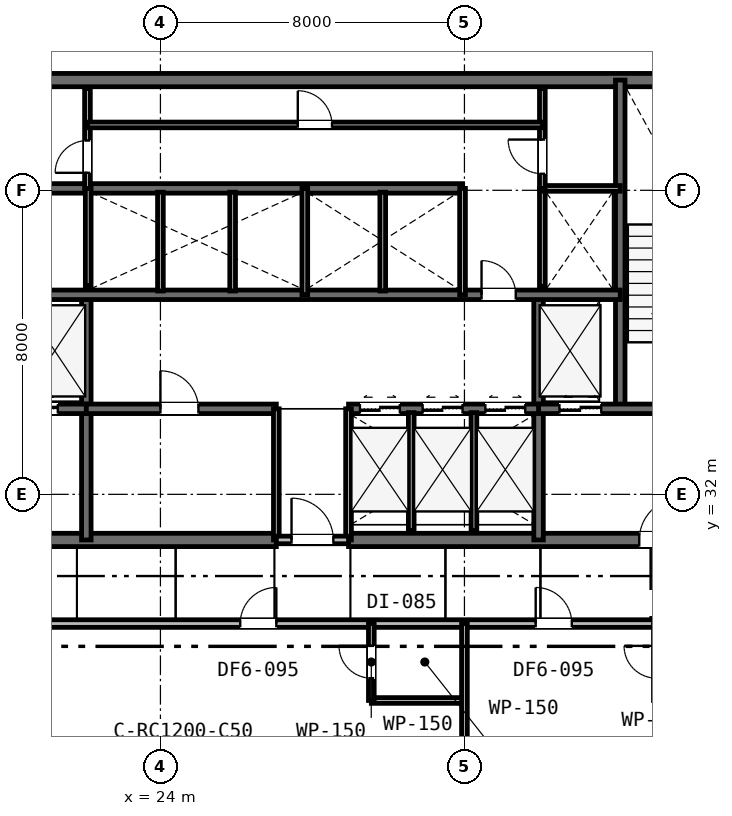
"""IFC4 building model, lengths in metres.
Left out: names, types, materials, properties, quantities, classifications, styles, units other than length and angle.
Written with IfcOpenShell. Run it as: python <this file> out.ifc"""

import sys

from ifc_helpers import new_model, si_unit, direction, frame, frame_2d, origin, place, context, subcontext, project, spatial, rectangle, extrude, element, fill, save


model = new_model("IFC4")
c1 = context("Model", 3, precision=1e-05, world=origin(), true_north=direction((0.0, 1.0)))
c2 = subcontext(c1, "Body", "Model", "MODEL_VIEW")
j1 = project(units=[si_unit("LENGTHUNIT", "METRE"), si_unit("PLANEANGLEUNIT", "RADIAN")], contexts=[c1])
p1 = place(None, origin())
s1 = spatial("IfcSite", under=j1, at=p1, CompositionType="ELEMENT")
p2 = place(p1, origin())
s2 = spatial("IfcBuilding", under=s1, at=p2, CompositionType="ELEMENT")
p3 = place(p2, frame((0.0, 0.0, 97.2)))
s3 = spatial("IfcBuildingStorey", under=s2, at=p3, CompositionType="ELEMENT", Elevation=97.2)
p4 = place(p3, frame((15.85, 42.9, 0.0), z_axis=(0.0, 0.0, 1.0), x_axis=(1.0, 0.0, 0.0)))
e1 = element("IfcWall", 1, at=p4, inside=s3, PredefinedType="SHEAR", context=c2, shape_type="SweptSolid", body=[
    extrude(rectangle(XDim=24.3, YDim=0.35, at=frame_2d((12.15, 0.0))), origin(), (0.0, 0.0, 1.0), 3.6),
])
p5 = place(p3, frame((15.85, 30.8, 0.0), z_axis=(0.0, 0.0, 1.0), x_axis=(1.0, 0.0, 0.0)))
e2 = element("IfcWall", 2, at=p5, inside=s3, PredefinedType="SHEAR", context=c2, shape_type="SweptSolid", body=[
    extrude(rectangle(XDim=11.2, YDim=0.35, at=frame_2d((5.6, 0.0))), origin(), (0.0, 0.0, 1.0), 3.6),
])
p6 = place(p5, frame((2.45, 0.0, 0.0)))
e3 = element("IfcOpeningElement", 3, at=p6, cuts=e2, PredefinedType="OPENING", context=c2, shape_type="SweptSolid", body=[
    extrude(rectangle(XDim=1.1, YDim=2.15, at=frame_2d((0.55, 1.075))), frame((0.0, 0.185, 0.0), z_axis=(0.0, -1.0, 0.0), x_axis=(1.0, 0.0, 0.0)), (0.0, 0.0, 1.0), 0.37),
])
p7 = place(p3, frame((28.95, 30.8, 0.0), z_axis=(0.0, 0.0, 1.0), x_axis=(1.0, 0.0, 0.0)))
e4 = element("IfcWall", 4, at=p7, inside=s3, PredefinedType="SHEAR", context=c2, shape_type="SweptSolid", body=[
    extrude(rectangle(XDim=11.2, YDim=0.35, at=frame_2d((5.6, 0.0))), origin(), (0.0, 0.0, 1.0), 3.6),
])
p8 = place(p7, frame((7.65, 0.0, 0.0)))
e5 = element("IfcOpeningElement", 5, at=p8, cuts=e4, PredefinedType="OPENING", context=c2, shape_type="SweptSolid", body=[
    extrude(rectangle(XDim=1.1, YDim=2.15, at=frame_2d((0.55, 1.075))), frame((0.0, 0.185, 0.0), z_axis=(0.0, -1.0, 0.0), x_axis=(1.0, 0.0, 0.0)), (0.0, 0.0, 1.0), 0.37),
])
p9 = place(p3, frame((36.1, 34.25, 0.0), z_axis=(0.0, 0.0, 1.0), x_axis=(0.0, 1.0, 0.0)))
e6 = element("IfcWall", 6, at=p9, inside=s3, PredefinedType="SHEAR", context=c2, shape_type="SweptSolid", body=[
    extrude(rectangle(XDim=8.65, YDim=0.25, at=frame_2d((4.325, 0.0))), origin(), (0.0, 0.0, 1.0), 3.6),
])
for number, where, z_axis, x_axis in (
    (7, (22.05, 30.8, 0.0), (0.0, 0.0, 1.0), (0.0, 1.0, 0.0)),
    (8, (33.95, 30.8, 0.0), (0.0, 0.0, 1.0), (0.0, 1.0, 0.0)),
):
    element("IfcWall", number, at=place(p3, frame(where, z_axis=z_axis, x_axis=x_axis)), inside=s3, PredefinedType="SHEAR", context=c2, shape_type="SweptSolid", body=[
        extrude(rectangle(XDim=6.45, YDim=0.25, at=frame_2d((3.225, 0.0))), origin(), (0.0, 0.0, 1.0), 3.6),
    ])
p10 = place(p3, frame((16.0, 34.25, 0.0), z_axis=(0.0, 0.0, 1.0), x_axis=(1.0, 0.0, 0.0)))
e9 = element("IfcWall", 9, at=p10, inside=s3, PredefinedType="SHEAR", context=c2, shape_type="SweptSolid", body=[
    extrude(rectangle(XDim=6.05, YDim=0.25, at=frame_2d((3.025, 0.0))), origin(), (0.0, 0.0, 1.0), 3.6),
])
p11 = place(p10, frame((1.25, 0.0, 0.0)))
e10 = element("IfcOpeningElement", 10, at=p11, cuts=e9, PredefinedType="OPENING", context=c2, shape_type="SweptSolid", body=[
    extrude(rectangle(XDim=1.0, YDim=2.15, at=frame_2d((0.5, 1.075))), frame((0.0, 0.135, 0.0), z_axis=(0.0, -1.0, 0.0), x_axis=(1.0, 0.0, 0.0)), (0.0, 0.0, 1.0), 0.27),
])
p12 = place(p10, frame((4.2, 0.0, 0.0)))
e11 = element("IfcOpeningElement", 11, at=p12, cuts=e9, PredefinedType="OPENING", context=c2, shape_type="SweptSolid", body=[
    extrude(rectangle(XDim=1.1, YDim=2.15, at=frame_2d((0.55, 1.075))), frame((0.0, 0.135, 0.0), z_axis=(0.0, -1.0, 0.0), x_axis=(1.0, 0.0, 0.0)), (0.0, 0.0, 1.0), 0.27),
])
p13 = place(p3, frame((33.95, 34.25, 0.0), z_axis=(0.0, 0.0, 1.0), x_axis=(1.0, 0.0, 0.0)))
e12 = element("IfcWall", 12, at=p13, inside=s3, PredefinedType="SHEAR", context=c2, shape_type="SweptSolid", body=[
    extrude(rectangle(XDim=6.05, YDim=0.25, at=frame_2d((3.025, 0.0))), origin(), (0.0, 0.0, 1.0), 3.6),
])
p14 = place(p13, frame((3.7, 0.0, 0.0)))
e13 = element("IfcOpeningElement", 13, at=p14, cuts=e12, PredefinedType="OPENING", context=c2, shape_type="SweptSolid", body=[
    extrude(rectangle(XDim=1.0, YDim=2.15, at=frame_2d((0.5, 1.075))), frame((0.0, 0.135, 0.0), z_axis=(0.0, -1.0, 0.0), x_axis=(1.0, 0.0, 0.0)), (0.0, 0.0, 1.0), 0.27),
])
p15 = place(p13, frame((0.55, 0.0, 0.0)))
e14 = element("IfcOpeningElement", 14, at=p15, cuts=e12, PredefinedType="OPENING", context=c2, shape_type="SweptSolid", body=[
    extrude(rectangle(XDim=1.1, YDim=2.15, at=frame_2d((0.55, 1.075))), frame((0.0, 0.135, 0.0), z_axis=(0.0, -1.0, 0.0), x_axis=(1.0, 0.0, 0.0)), (0.0, 0.0, 1.0), 0.27),
])
p16 = place(p3, frame((22.05, 34.25, 0.0), z_axis=(0.0, 0.0, 1.0), x_axis=(1.0, 0.0, 0.0)))
e15 = element("IfcWall", 15, at=p16, inside=s3, PredefinedType="SHEAR", context=c2, shape_type="SweptSolid", body=[
    extrude(rectangle(XDim=5.0, YDim=0.25, at=frame_2d((2.5, 0.0))), origin(), (0.0, 0.0, 1.0), 3.6),
])
p17 = place(p16, frame((1.95, 0.0, 0.0)))
e16 = element("IfcOpeningElement", 16, at=p17, cuts=e15, PredefinedType="OPENING", context=c2, shape_type="SweptSolid", body=[
    extrude(rectangle(XDim=1.0, YDim=2.15, at=frame_2d((0.5, 1.075))), frame((0.0, 0.135, 0.0), z_axis=(0.0, -1.0, 0.0), x_axis=(1.0, 0.0, 0.0)), (0.0, 0.0, 1.0), 0.27),
])
p18 = place(p3, frame((28.95, 34.25, 0.0), z_axis=(0.0, 0.0, 1.0), x_axis=(1.0, 0.0, 0.0)))
e17 = element("IfcWall", 17, at=p18, inside=s3, PredefinedType="SHEAR", context=c2, shape_type="SweptSolid", body=[
    extrude(rectangle(XDim=5.0, YDim=0.25, at=frame_2d((2.5, 0.0))), origin(), (0.0, 0.0, 1.0), 3.6),
])
p19 = place(p18, frame((0.3, 0.0, 0.0)))
e18 = element("IfcOpeningElement", 18, at=p19, cuts=e17, PredefinedType="OPENING", context=c2, shape_type="SweptSolid", body=[
    extrude(rectangle(XDim=1.05, YDim=2.15, at=frame_2d((0.525, 1.075))), frame((0.0, 0.135, 0.0), z_axis=(0.0, -1.0, 0.0), x_axis=(1.0, 0.0, 0.0)), (0.0, 0.0, 1.0), 0.27),
])
p20 = place(p18, frame((1.95, 0.0, 0.0)))
e19 = element("IfcOpeningElement", 19, at=p20, cuts=e17, PredefinedType="OPENING", context=c2, shape_type="SweptSolid", body=[
    extrude(rectangle(XDim=1.05, YDim=2.15, at=frame_2d((0.525, 1.075))), frame((0.0, 0.135, 0.0), z_axis=(0.0, -1.0, 0.0), x_axis=(1.0, 0.0, 0.0)), (0.0, 0.0, 1.0), 0.27),
])
p21 = place(p18, frame((3.6, 0.0, 0.0)))
e20 = element("IfcOpeningElement", 20, at=p21, cuts=e17, PredefinedType="OPENING", context=c2, shape_type="SweptSolid", body=[
    extrude(rectangle(XDim=1.05, YDim=2.15, at=frame_2d((0.525, 1.075))), frame((0.0, 0.135, 0.0), z_axis=(0.0, -1.0, 0.0), x_axis=(1.0, 0.0, 0.0)), (0.0, 0.0, 1.0), 0.27),
])
p22 = place(p3, frame((19.9, 37.25, 0.0), z_axis=(0.0, 0.0, 1.0), x_axis=(1.0, 0.0, 0.0)))
e21 = element("IfcWall", 21, at=p22, inside=s3, PredefinedType="SHEAR", context=c2, shape_type="SweptSolid", body=[
    extrude(rectangle(XDim=16.2, YDim=0.25, at=frame_2d((8.1, 0.0))), origin(), (0.0, 0.0, 1.0), 3.6),
])
p23 = place(p22, frame((12.55, 0.0, 0.0)))
e22 = element("IfcOpeningElement", 22, at=p23, cuts=e21, PredefinedType="OPENING", context=c2, shape_type="SweptSolid", body=[
    extrude(rectangle(XDim=0.9, YDim=2.15, at=frame_2d((0.45, 1.075))), frame((0.0, 0.135, 0.0), z_axis=(0.0, -1.0, 0.0), x_axis=(1.0, 0.0, 0.0)), (0.0, 0.0, 1.0), 0.27),
])
p24 = place(p3, frame((19.9, 40.05, 0.0), z_axis=(0.0, 0.0, 1.0), x_axis=(1.0, 0.0, 0.0)))
e23 = element("IfcWall", 23, at=p24, inside=s3, PredefinedType="SHEAR", context=c2, shape_type="SweptSolid", body=[
    extrude(rectangle(XDim=12.05, YDim=0.25, at=frame_2d((6.025, 0.0))), origin(), (0.0, 0.0, 1.0), 3.6),
])
p25 = place(p3, frame((27.05, 30.8, 0.0), z_axis=(0.0, 0.0, 1.0), x_axis=(0.0, 1.0, 0.0)))
e24 = element("IfcWall", 24, at=p25, inside=s3, PredefinedType="PLUMBINGWALL", context=c2, shape_type="SweptSolid", body=[
    extrude(rectangle(XDim=3.45, YDim=0.15, at=frame_2d((1.725, 0.0))), origin(), (0.0, 0.0, 1.0), 3.02),
])
p26 = place(p3, frame((28.95, 30.8, 0.0), z_axis=(0.0, 0.0, 1.0), x_axis=(0.0, 1.0, 0.0)))
e25 = element("IfcWall", 25, at=p26, inside=s3, PredefinedType="PLUMBINGWALL", context=c2, shape_type="SweptSolid", body=[
    extrude(rectangle(XDim=3.45, YDim=0.15, at=frame_2d((1.725, 0.0))), origin(), (0.0, 0.0, 1.0), 3.33),
])
p27 = place(p3, frame((27.05, 30.8, 0.0), z_axis=(0.0, 0.0, 1.0), x_axis=(1.0, 0.0, 0.0)))
e26 = element("IfcWall", 26, at=p27, inside=s3, PredefinedType="PARTITIONING", context=c2, shape_type="SweptSolid", body=[
    extrude(rectangle(XDim=1.9, YDim=0.2, at=frame_2d((0.95, 0.0))), origin(), (0.0, 0.0, 1.0), 3.02),
])
p28 = place(p27, frame((0.4, 0.0, 0.0)))
e27 = element("IfcOpeningElement", 27, at=p28, cuts=e26, PredefinedType="OPENING", context=c2, shape_type="SweptSolid", body=[
    extrude(rectangle(XDim=1.1, YDim=2.15, at=frame_2d((0.55, 1.075))), frame((0.0, 0.11, 0.0), z_axis=(0.0, -1.0, 0.0), x_axis=(1.0, 0.0, 0.0)), (0.0, 0.0, 1.0), 0.22),
])
for number, where, z_axis, x_axis in (
    (28, (30.6, 31.05, 0.0), (0.0, 0.0, 1.0), (0.0, 1.0, 0.0)),
    (29, (32.25, 31.05, 0.0), (0.0, 0.0, 1.0), (0.0, 1.0, 0.0)),
):
    element("IfcWall", number, at=place(p3, frame(where, z_axis=z_axis, x_axis=x_axis)), inside=s3, PredefinedType="PLUMBINGWALL", context=c2, shape_type="SweptSolid", body=[
        extrude(rectangle(XDim=3.1, YDim=0.15, at=frame_2d((1.55, 0.0))), origin(), (0.0, 0.0, 1.0), 3.33),
    ])
p29 = place(p3, frame((22.1, 37.49, 0.0), z_axis=(0.0, 0.0, 1.0), x_axis=(0.0, 1.0, 0.0)))
e30 = element("IfcWall", 30, at=p29, inside=s3, PredefinedType="PLUMBINGWALL", context=c2, shape_type="SweptSolid", body=[
    extrude(rectangle(XDim=2.56, YDim=0.15, at=frame_2d((1.28, 0.0))), origin(), (0.0, 0.0, 1.0), 3.33),
])
p30 = place(p3, frame((27.8, 37.25, 0.0), z_axis=(0.0, 0.0, 1.0), x_axis=(0.0, 1.0, 0.0)))
e31 = element("IfcWall", 31, at=p30, inside=s3, PredefinedType="PLUMBINGWALL", context=c2, shape_type="SweptSolid", body=[
    extrude(rectangle(XDim=2.8, YDim=0.15, at=frame_2d((1.4, 0.0))), origin(), (0.0, 0.0, 1.0), 3.33),
])
for number, where, z_axis, x_axis in (
    (32, (24.0, 37.35, 0.0), (0.0, 0.0, 1.0), (0.0, 1.0, 0.0)),
    (33, (25.9, 37.35, 0.0), (0.0, 0.0, 1.0), (0.0, 1.0, 0.0)),
):
    element("IfcWall", number, at=place(p3, frame(where, z_axis=z_axis, x_axis=x_axis)), inside=s3, PredefinedType="PLUMBINGWALL", context=c2, shape_type="SweptSolid", body=[
        extrude(rectangle(XDim=2.6, YDim=0.15, at=frame_2d((1.3, 0.0))), origin(), (0.0, 0.0, 1.0), 3.33),
    ])
p31 = place(p3, frame((31.95, 37.25, 0.0), z_axis=(0.0, 0.0, 1.0), x_axis=(0.0, 1.0, 0.0)))
e34 = element("IfcWall", 34, at=p31, inside=s3, PredefinedType="PLUMBINGWALL", context=c2, shape_type="SweptSolid", body=[
    extrude(rectangle(XDim=2.8, YDim=0.15, at=frame_2d((1.4, 0.0))), origin(), (0.0, 0.0, 1.0), 3.33),
])
p32 = place(p3, frame((29.85, 37.35, 0.0), z_axis=(0.0, 0.0, 1.0), x_axis=(0.0, 1.0, 0.0)))
e35 = element("IfcWall", 35, at=p32, inside=s3, PredefinedType="PLUMBINGWALL", context=c2, shape_type="SweptSolid", body=[
    extrude(rectangle(XDim=2.6, YDim=0.15, at=frame_2d((1.3, 0.0))), origin(), (0.0, 0.0, 1.0), 3.33),
])
p33 = place(p3, frame((34.05, 37.473, 0.0), z_axis=(0.0, 0.0, 1.0), x_axis=(0.0, 1.0, 0.0)))
e36 = element("IfcWall", 36, at=p33, inside=s3, PredefinedType="PLUMBINGWALL", context=c2, shape_type="SweptSolid", body=[
    extrude(rectangle(XDim=2.577, YDim=0.15, at=frame_2d((1.288, 0.0))), origin(), (0.0, 0.0, 1.0), 3.33),
])
p34 = place(p3, frame((34.05, 40.05, 0.0), z_axis=(0.0, 0.0, 1.0), x_axis=(1.0, 0.0, 0.0)))
e37 = element("IfcWall", 37, at=p34, inside=s3, PredefinedType="PARTITIONING", context=c2, shape_type="SweptSolid", body=[
    extrude(rectangle(XDim=2.05, YDim=0.15, at=frame_2d((1.025, 0.0))), origin(), (0.0, 0.0, 1.0), 3.33),
])
p35 = place(p3, frame((34.05, 40.05, 0.0), z_axis=(0.0, 0.0, 1.0), x_axis=(0.0, 1.0, 0.0)))
e38 = element("IfcWall", 38, at=p35, inside=s3, PredefinedType="PARTITIONING", context=c2, shape_type="SweptSolid", body=[
    extrude(rectangle(XDim=2.63, YDim=0.15, at=frame_2d((1.315, 0.0))), origin(), (0.0, 0.0, 1.0), 3.33),
])
p36 = place(p35, frame((0.385, 0.0, 0.0)))
e39 = element("IfcOpeningElement", 39, at=p36, cuts=e38, PredefinedType="OPENING", context=c2, shape_type="SweptSolid", body=[
    extrude(rectangle(XDim=0.9, YDim=2.15, at=frame_2d((0.45, 1.075))), frame((0.0, 0.085, 0.0), z_axis=(0.0, -1.0, 0.0), x_axis=(1.0, 0.0, 0.0)), (0.0, 0.0, 1.0), 0.17),
])
p37 = place(p3, frame((22.08, 40.05, 0.0), z_axis=(0.0, 0.0, 1.0), x_axis=(0.0, 1.0, 0.0)))
e40 = element("IfcWall", 40, at=p37, inside=s3, PredefinedType="PARTITIONING", context=c2, shape_type="SweptSolid", body=[
    extrude(rectangle(XDim=2.63, YDim=0.15, at=frame_2d((1.315, 0.0))), origin(), (0.0, 0.0, 1.0), 3.33),
])
p38 = place(p37, frame((0.41, 0.0, 0.0)))
e41 = element("IfcOpeningElement", 41, at=p38, cuts=e40, PredefinedType="OPENING", context=c2, shape_type="SweptSolid", body=[
    extrude(rectangle(XDim=0.85, YDim=2.15, at=frame_2d((0.425, 1.075))), frame((0.0, 0.085, 0.0), z_axis=(0.0, -1.0, 0.0), x_axis=(1.0, 0.0, 0.0)), (0.0, 0.0, 1.0), 0.17),
])
p39 = place(p3, frame((22.08, 41.72, 0.0), z_axis=(0.0, 0.0, 1.0), x_axis=(1.0, 0.0, 0.0)))
e42 = element("IfcWall", 42, at=p39, inside=s3, PredefinedType="PARTITIONING", context=c2, shape_type="SweptSolid", body=[
    extrude(rectangle(XDim=11.97, YDim=0.15, at=frame_2d((5.985, 0.0))), origin(), (0.0, 0.0, 1.0), 3.33),
])
p40 = place(p39, frame((5.535, 0.0, 0.0)))
e43 = element("IfcOpeningElement", 43, at=p40, cuts=e42, PredefinedType="OPENING", context=c2, shape_type="SweptSolid", body=[
    extrude(rectangle(XDim=0.9, YDim=2.15, at=frame_2d((0.45, 1.075))), frame((0.0, 0.085, 0.0), z_axis=(0.0, -1.0, 0.0), x_axis=(1.0, 0.0, 0.0)), (0.0, 0.0, 1.0), 0.17),
])
p41 = place(p3, frame((11.4, 28.6, 0.0), z_axis=(0.0, 0.0, 1.0), x_axis=(1.0, 0.0, 0.0)))
e44 = element("IfcWall", 44, at=p41, inside=s3, PredefinedType="PARTITIONING", context=c2, shape_type="SweptSolid", body=[
    extrude(rectangle(XDim=32.8, YDim=0.2, at=frame_2d((16.4, 0.0))), origin(), (0.0, 0.0, 1.0), 2.83),
])
p42 = place(p41, frame((14.7, 0.0, 0.0)))
e45 = element("IfcOpeningElement", 45, at=p42, cuts=e44, PredefinedType="OPENING", context=c2, shape_type="SweptSolid", body=[
    extrude(rectangle(XDim=0.95, YDim=2.15, at=frame_2d((0.475, 1.075))), frame((0.0, 0.11, 0.0), z_axis=(0.0, -1.0, 0.0), x_axis=(1.0, 0.0, 0.0)), (0.0, 0.0, 1.0), 0.22),
])
p43 = place(p41, frame((22.475, 0.0, 0.0)))
e46 = element("IfcOpeningElement", 46, at=p43, cuts=e44, PredefinedType="OPENING", context=c2, shape_type="SweptSolid", body=[
    extrude(rectangle(XDim=0.95, YDim=2.15, at=frame_2d((0.475, 1.075))), frame((0.0, 0.11, 0.0), z_axis=(0.0, -1.0, 0.0), x_axis=(1.0, 0.0, 0.0)), (0.0, 0.0, 1.0), 0.22),
])
p44 = place(p41, frame((28.985, 0.0, 0.0)))
e47 = element("IfcOpeningElement", 47, at=p44, cuts=e44, PredefinedType="OPENING", context=c2, shape_type="SweptSolid", body=[
    extrude(rectangle(XDim=0.95, YDim=2.15, at=frame_2d((0.475, 1.075))), frame((0.0, 0.11, 0.0), z_axis=(0.0, -1.0, 0.0), x_axis=(1.0, 0.0, 0.0)), (0.0, 0.0, 1.0), 0.22),
])
p45 = place(p3, frame((29.55, 26.576, 0.0), z_axis=(0.0, 0.0, 1.0), x_axis=(1.0, 0.0, 0.0)))
e48 = element("IfcWall", 48, at=p45, inside=s3, PredefinedType="PARTITIONING", context=c2, shape_type="SweptSolid", body=[
    extrude(rectangle(XDim=2.45, YDim=0.15, at=frame_2d((1.225, 0.0))), origin(), (0.0, 0.0, 1.0), 3.33),
])
p46 = place(p3, frame((29.55, 26.576, 0.0), z_axis=(0.0, 0.0, 1.0), x_axis=(0.0, 1.0, 0.0)))
e49 = element("IfcWall", 49, at=p46, inside=s3, PredefinedType="PARTITIONING", context=c2, shape_type="SweptSolid", body=[
    extrude(rectangle(XDim=2.024, YDim=0.15, at=frame_2d((1.012, 0.0))), origin(), (0.0, 0.0, 1.0), 3.33),
])
p47 = place(p46, frame((0.587, 0.0, 0.0)))
e50 = element("IfcOpeningElement", 50, at=p47, cuts=e49, PredefinedType="OPENING", context=c2, shape_type="SweptSolid", body=[
    extrude(rectangle(XDim=0.85, YDim=2.15, at=frame_2d((0.425, 1.075))), frame((0.0, 0.085, 0.0), z_axis=(0.0, -1.0, 0.0), x_axis=(1.0, 0.0, 0.0)), (0.0, 0.0, 1.0), 0.17),
])
p48 = place(p3, frame((32.0, 28.6, 0.0), z_axis=(0.0, 0.0, 1.0), x_axis=(0.0, -1.0, 0.0)))
e51 = element("IfcWall", 51, at=p48, inside=s3, PredefinedType="PARTITIONING", context=c2, shape_type="SweptSolid", body=[
    extrude(rectangle(XDim=4.5, YDim=0.15, at=frame_2d((2.25, 0.0))), origin(), (0.0, 0.0, 1.0), 2.92),
])
p49 = place(p28, origin())
e52 = element("IfcDoor", 52, at=p49, inside=s3, OperationType="SINGLE_SWING_LEFT", PredefinedType="DOOR", context=c2, shape_type="SweptSolid", body=[
    extrude(rectangle(XDim=1.1, YDim=2.15, at=frame_2d((0.55, 1.075))), frame((0.0, 0.025, 0.0), z_axis=(0.0, -1.0, 0.0), x_axis=(1.0, 0.0, 0.0)), (0.0, 0.0, 1.0), 0.05),
])
fill(e27, e52)
p50 = place(p8, origin())
e53 = element("IfcDoor", 53, at=p50, inside=s3, OperationType="SINGLE_SWING_RIGHT", PredefinedType="DOOR", context=c2, shape_type="SweptSolid", body=[
    extrude(rectangle(XDim=1.1, YDim=2.15, at=frame_2d((0.55, 1.075))), frame((0.0, 0.025, 0.0), z_axis=(0.0, -1.0, 0.0), x_axis=(1.0, 0.0, 0.0)), (0.0, 0.0, 1.0), 0.05),
])
fill(e5, e53)
p51 = place(p17, origin())
e54 = element("IfcDoor", 54, at=p51, inside=s3, OperationType="SINGLE_SWING_LEFT", PredefinedType="DOOR", context=c2, shape_type="SweptSolid", body=[
    extrude(rectangle(XDim=1.0, YDim=2.15, at=frame_2d((0.5, 1.075))), frame((0.0, 0.025, 0.0), z_axis=(0.0, -1.0, 0.0), x_axis=(1.0, 0.0, 0.0)), (0.0, 0.0, 1.0), 0.05),
])
fill(e16, e54)
p52 = place(p23, origin())
e55 = element("IfcDoor", 55, at=p52, inside=s3, OperationType="SINGLE_SWING_LEFT", PredefinedType="DOOR", context=c2, shape_type="SweptSolid", body=[
    extrude(rectangle(XDim=0.9, YDim=2.15, at=frame_2d((0.45, 1.075))), frame((0.0, 0.025, 0.0), z_axis=(0.0, -1.0, 0.0), x_axis=(1.0, 0.0, 0.0)), (0.0, 0.0, 1.0), 0.05),
])
fill(e22, e55)
p53 = place(p36, origin())
e56 = element("IfcDoor", 56, at=p53, inside=s3, OperationType="SINGLE_SWING_RIGHT", PredefinedType="DOOR", context=c2, shape_type="SweptSolid", body=[
    extrude(rectangle(XDim=0.9, YDim=2.15, at=frame_2d((0.45, 1.075))), frame((0.0, 0.025, 0.0), z_axis=(0.0, -1.0, 0.0), x_axis=(1.0, 0.0, 0.0)), (0.0, 0.0, 1.0), 0.05),
])
fill(e39, e56)
p54 = place(p38, origin())
e57 = element("IfcDoor", 57, at=p54, inside=s3, OperationType="SINGLE_SWING_LEFT", PredefinedType="DOOR", context=c2, shape_type="SweptSolid", body=[
    extrude(rectangle(XDim=0.85, YDim=2.15, at=frame_2d((0.425, 1.075))), frame((0.0, 0.025, 0.0), z_axis=(0.0, -1.0, 0.0), x_axis=(1.0, 0.0, 0.0)), (0.0, 0.0, 1.0), 0.05),
])
fill(e41, e57)
p55 = place(p40, origin())
e58 = element("IfcDoor", 58, at=p55, inside=s3, OperationType="SINGLE_SWING_LEFT", PredefinedType="DOOR", context=c2, shape_type="SweptSolid", body=[
    extrude(rectangle(XDim=0.9, YDim=2.15, at=frame_2d((0.45, 1.075))), frame((0.0, 0.025, 0.0), z_axis=(0.0, -1.0, 0.0), x_axis=(1.0, 0.0, 0.0)), (0.0, 0.0, 1.0), 0.05),
])
fill(e43, e58)
p56 = place(p42, origin())
e59 = element("IfcDoor", 59, at=p56, inside=s3, OperationType="SINGLE_SWING_RIGHT", PredefinedType="DOOR", context=c2, shape_type="SweptSolid", body=[
    extrude(rectangle(XDim=0.95, YDim=2.15, at=frame_2d((0.475, 1.075))), frame((0.0, 0.025, 0.0), z_axis=(0.0, -1.0, 0.0), x_axis=(1.0, 0.0, 0.0)), (0.0, 0.0, 1.0), 0.05),
])
fill(e45, e59)
p57 = place(p47, origin())
e60 = element("IfcDoor", 60, at=p57, inside=s3, OperationType="SINGLE_SWING_RIGHT", PredefinedType="DOOR", context=c2, shape_type="SweptSolid", body=[
    extrude(rectangle(XDim=0.85, YDim=2.15, at=frame_2d((0.425, 1.075))), frame((0.0, 0.025, 0.0), z_axis=(0.0, -1.0, 0.0), x_axis=(1.0, 0.0, 0.0)), (0.0, 0.0, 1.0), 0.05),
])
fill(e50, e60)
p58 = place(p43, origin())
e61 = element("IfcDoor", 61, at=p58, inside=s3, OperationType="SINGLE_SWING_LEFT", PredefinedType="DOOR", context=c2, shape_type="SweptSolid", body=[
    extrude(rectangle(XDim=0.95, YDim=2.15, at=frame_2d((0.475, 1.075))), frame((0.0, 0.025, 0.0), z_axis=(0.0, -1.0, 0.0), x_axis=(1.0, 0.0, 0.0)), (0.0, 0.0, 1.0), 0.05),
])
fill(e46, e61)
p59 = place(p12, origin())
e62 = element("IfcDoor", 62, at=p59, inside=s3, OperationType="DOUBLE_DOOR_SLIDING", PredefinedType="DOOR", context=c2, shape_type="SweptSolid", body=[
    extrude(rectangle(XDim=1.1, YDim=2.15, at=frame_2d((0.55, 1.075))), frame((0.0, 0.025, 0.0), z_axis=(0.0, -1.0, 0.0), x_axis=(1.0, 0.0, 0.0)), (0.0, 0.0, 1.0), 0.05),
])
fill(e11, e62)
p60 = place(p15, origin())
e63 = element("IfcDoor", 63, at=p60, inside=s3, OperationType="DOUBLE_DOOR_SLIDING", PredefinedType="DOOR", context=c2, shape_type="SweptSolid", body=[
    extrude(rectangle(XDim=1.1, YDim=2.15, at=frame_2d((0.55, 1.075))), frame((0.0, 0.025, 0.0), z_axis=(0.0, -1.0, 0.0), x_axis=(1.0, 0.0, 0.0)), (0.0, 0.0, 1.0), 0.05),
])
fill(e14, e63)
p61 = place(p19, origin())
e64 = element("IfcDoor", 64, at=p61, inside=s3, OperationType="DOUBLE_DOOR_SLIDING", PredefinedType="DOOR", context=c2, shape_type="SweptSolid", body=[
    extrude(rectangle(XDim=1.05, YDim=2.15, at=frame_2d((0.525, 1.075))), frame((0.0, 0.025, 0.0), z_axis=(0.0, -1.0, 0.0), x_axis=(1.0, 0.0, 0.0)), (0.0, 0.0, 1.0), 0.05),
])
fill(e18, e64)
p62 = place(p20, origin())
e65 = element("IfcDoor", 65, at=p62, inside=s3, OperationType="DOUBLE_DOOR_SLIDING", PredefinedType="DOOR", context=c2, shape_type="SweptSolid", body=[
    extrude(rectangle(XDim=1.05, YDim=2.15, at=frame_2d((0.525, 1.075))), frame((0.0, 0.025, 0.0), z_axis=(0.0, -1.0, 0.0), x_axis=(1.0, 0.0, 0.0)), (0.0, 0.0, 1.0), 0.05),
])
fill(e19, e65)
p63 = place(p21, origin())
e66 = element("IfcDoor", 66, at=p63, inside=s3, OperationType="DOUBLE_DOOR_SLIDING", PredefinedType="DOOR", context=c2, shape_type="SweptSolid", body=[
    extrude(rectangle(XDim=1.05, YDim=2.15, at=frame_2d((0.525, 1.075))), frame((0.0, 0.025, 0.0), z_axis=(0.0, -1.0, 0.0), x_axis=(1.0, 0.0, 0.0)), (0.0, 0.0, 1.0), 0.05),
])
fill(e20, e66)
save(model, sys.argv[1])
